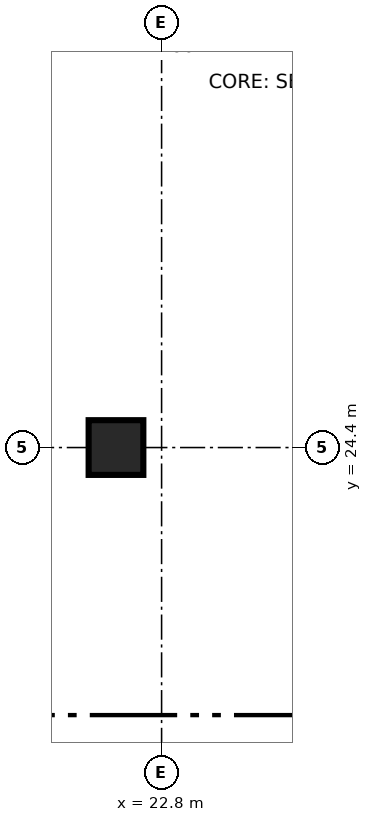
"""IFC4 building model, lengths in metres.
Left out: names, types, materials, properties, quantities, classifications, styles, units other than length and angle.
Written with IfcOpenShell. Run it as: python <this file> out.ifc"""

import sys

from ifc_helpers import new_model, si_unit, direction, frame, origin, origin_2d, place, context, subcontext, project, spatial, rectangle, extrude, source, transform, mapped, element, save


model = new_model("IFC4")
c1 = context("Model", 3, precision=1e-05, world=origin(), true_north=direction((0.0, 1.0)))
c2 = subcontext(c1, "Body", "Model", "MODEL_VIEW")
j1 = project(units=[si_unit("LENGTHUNIT", "METRE"), si_unit("PLANEANGLEUNIT", "RADIAN")], contexts=[c1])
p1 = place(None, origin())
s1 = spatial("IfcSite", under=j1, at=p1, CompositionType="ELEMENT")
p2 = place(p1, origin())
s2 = spatial("IfcBuilding", under=s1, at=p2, CompositionType="ELEMENT")
p3 = place(p2, frame((0.0, 0.0, 104.45)))
s3 = spatial("IfcBuildingStorey", under=s2, at=p3, CompositionType="ELEMENT", Elevation=104.45)
m1 = source(origin(), c2, "Body", "SweptSolid", [
    extrude(rectangle(XDim=0.9, YDim=0.9, at=origin_2d()), origin(), (0.0, 0.0, 1.0), 3.55),
])
p4 = place(p3, frame((22.05, 24.4, 0.0), z_axis=(0.0, 0.0, 1.0), x_axis=(1.0, 0.0, 0.0)))
e1 = element("IfcColumn", 1, at=p4, inside=s3, PredefinedType="COLUMN", context=c2, shape_type="MappedRepresentation", body=[
    mapped(m1, transform((0.0, 0.0, 0.0), x_axis=(1.0, 0.0, 0.0), y_axis=(0.0, 1.0, 0.0), z_axis=(0.0, 0.0, 1.0), scale=1.0)),
])
save(model, sys.argv[1])
